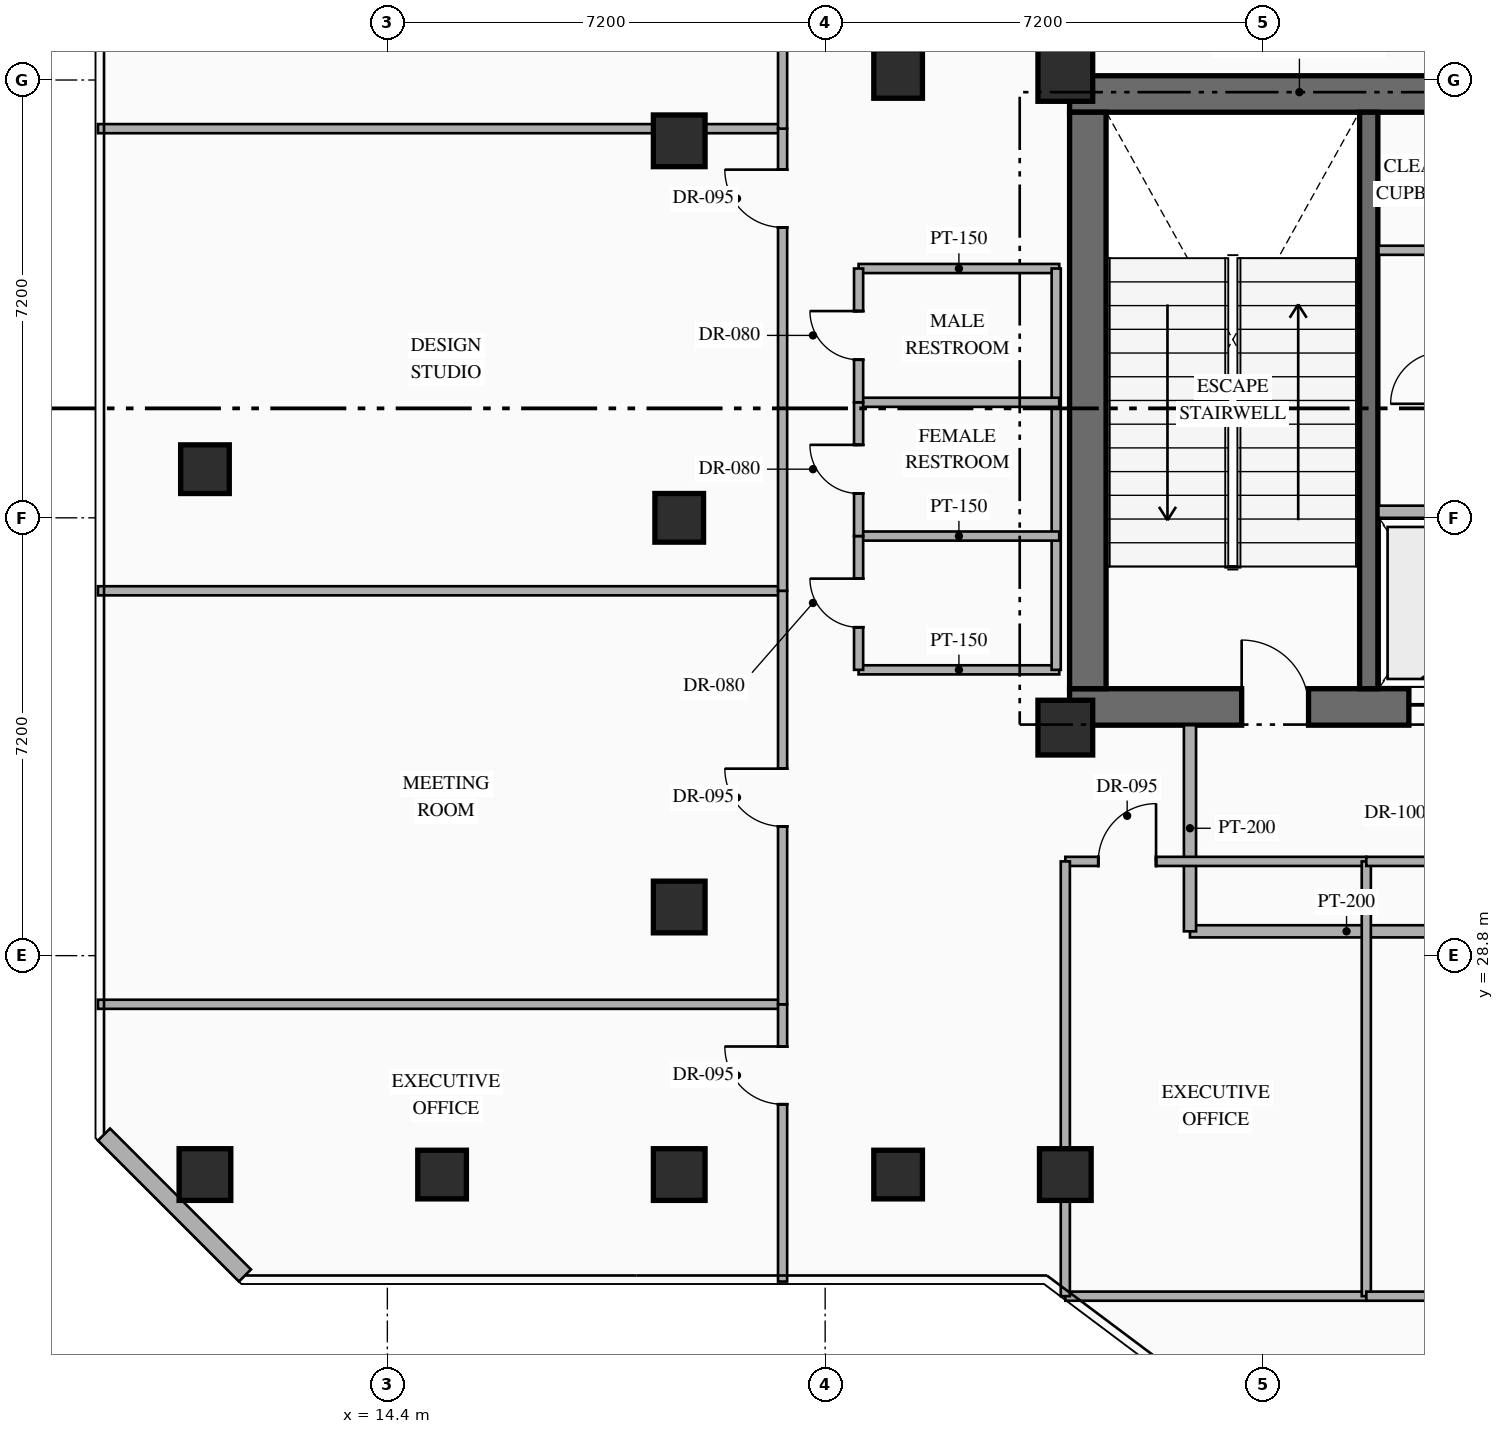
"""IFC4 building model, lengths in metres.
Left out: names, types, materials, properties, quantities, classifications, styles, units other than length and angle.
Written with IfcOpenShell. Run it as: python <this file> out.ifc"""

import sys

from ifc_helpers import new_model, si_unit, direction, frame, frame_2d, origin, origin_2d, place, context, subcontext, project, spatial, rectangle, hollow_rectangle, extrude, element, fill, save


model = new_model("IFC4")
c1 = context("Model", 3, precision=1e-05, world=origin(), true_north=direction((0.0, 1.0)))
c2 = subcontext(c1, "Body", "Model", "MODEL_VIEW")
j1 = project(units=[si_unit("LENGTHUNIT", "METRE"), si_unit("PLANEANGLEUNIT", "RADIAN")], contexts=[c1])
p1 = place(None, origin())
s1 = spatial("IfcSite", under=j1, at=p1, CompositionType="ELEMENT")
p2 = place(p1, origin())
s2 = spatial("IfcBuilding", under=s1, at=p2, CompositionType="ELEMENT")
p3 = place(p2, frame((0.0, 0.0, 130.05)))
s3 = spatial("IfcBuildingStorey", under=s2, at=p3, CompositionType="ELEMENT", Elevation=130.05)
p4 = place(p3, frame((25.62, 32.89, 0.0), z_axis=(0.0, 0.0, 1.0), x_axis=(1.0, 0.0, 0.0)))
e1 = element("IfcWall", 1, at=p4, inside=s3, PredefinedType="SHEAR", context=c2, shape_type="SweptSolid", body=[
    extrude(rectangle(XDim=7.78, YDim=0.6, at=frame_2d((3.89, 0.0))), origin(), (0.0, 0.0, 1.0), 4.8),
])
p5 = place(p4, frame((2.83, 0.0, 0.0)))
e2 = element("IfcOpeningElement", 2, at=p5, cuts=e1, PredefinedType="OPENING", context=c2, shape_type="SweptSolid", body=[
    extrude(rectangle(XDim=1.1, YDim=2.2, at=frame_2d((0.55, 1.1))), frame((0.0, 0.31, 0.0), z_axis=(0.0, -1.0, 0.0), x_axis=(1.0, 0.0, 0.0)), (0.0, 0.0, 1.0), 0.62),
])
p6 = place(p4, frame((5.58, 0.0, 0.0)))
e3 = element("IfcOpeningElement", 3, at=p6, cuts=e1, PredefinedType="OPENING", context=c2, shape_type="SweptSolid", body=[
    extrude(rectangle(XDim=1.1, YDim=2.15, at=frame_2d((0.55, 1.075))), frame((0.0, 0.31, 0.0), z_axis=(0.0, -1.0, 0.0), x_axis=(1.0, 0.0, 0.0)), (0.0, 0.0, 1.0), 0.62),
])
p7 = place(p3, frame((25.62, 42.97, 0.0), z_axis=(0.0, 0.0, 1.0), x_axis=(1.0, 0.0, 0.0)))
e4 = element("IfcWall", 4, at=p7, inside=s3, PredefinedType="SHEAR", context=c2, shape_type="SweptSolid", body=[
    extrude(rectangle(XDim=7.78, YDim=0.6, at=frame_2d((3.89, 0.0))), origin(), (0.0, 0.0, 1.0), 4.8),
])
p8 = place(p3, frame((25.92, 33.19, 0.0), z_axis=(0.0, 0.0, 1.0), x_axis=(0.0, 1.0, 0.0)))
e5 = element("IfcWall", 5, at=p8, inside=s3, PredefinedType="SHEAR", context=c2, shape_type="SweptSolid", body=[
    extrude(rectangle(XDim=9.48, YDim=0.6, at=frame_2d((4.74, 0.0))), origin(), (0.0, 0.0, 1.0), 4.8),
])
p9 = place(p3, frame((30.54, 33.19, 0.0), z_axis=(0.0, 0.0, 1.0), x_axis=(0.0, 1.0, 0.0)))
e6 = element("IfcWall", 6, at=p9, inside=s3, PredefinedType="SHEAR", context=c2, shape_type="SweptSolid", body=[
    extrude(rectangle(XDim=9.48, YDim=0.3, at=frame_2d((4.74, 0.0))), origin(), (0.0, 0.0, 1.0), 4.8),
])
for number, where, z_axis, x_axis in (
    (7, (25.55, 32.55, 0.0), (0.0, 0.0, 1.0), (1.0, 0.0, 0.0)),
    (8, (25.55, 43.3, 0.0), (0.0, 0.0, 1.0), (1.0, 0.0, 0.0)),
):
    element("IfcColumn", number, at=place(p3, frame(where, z_axis=z_axis, x_axis=x_axis)), inside=s3, PredefinedType="COLUMN", context=c2, shape_type="SweptSolid", body=[
        extrude(rectangle(XDim=0.9, YDim=0.9, at=origin_2d()), origin(), (0.0, 0.0, 1.0), 4.8),
    ])
for number, where, z_axis, x_axis in (
    (9, (25.55, 25.2, 0.0), (0.0, 0.0, 1.0), (1.0, 0.0, 0.0)),
    (10, (11.4, 25.2, 0.0), (0.0, 0.0, 1.0), (1.0, 0.0, 0.0)),
    (11, (19.2, 25.2, 0.0), (0.0, 0.0, 1.0), (1.0, 0.0, 0.0)),
    (12, (19.2, 29.6, 0.0), (0.0, 0.0, 1.0), (1.0, 0.0, 0.0)),
    (13, (19.2, 42.2, 0.0), (0.0, 0.0, 1.0), (1.0, 0.0, 0.0)),
):
    element("IfcColumn", number, at=place(p3, frame(where, z_axis=z_axis, x_axis=x_axis)), inside=s3, PredefinedType="COLUMN", context=c2, shape_type="SweptSolid", body=[
        extrude(hollow_rectangle(XDim=0.85, YDim=0.85, WallThickness=0.032, at=origin_2d()), origin(), (0.0, 0.0, 1.0), 4.8),
    ])
for number, where, z_axis, x_axis in (
    (14, (22.8, 25.2, 0.0), (0.0, 0.0, 1.0), (1.0, 0.0, 0.0)),
    (15, (22.8, 43.3, 0.0), (0.0, 0.0, 1.0), (1.0, 0.0, 0.0)),
    (16, (11.4, 36.8, 0.0), (0.0, 0.0, 1.0), (1.0, 0.0, 0.0)),
    (17, (19.2, 36.0, 0.0), (0.0, 0.0, 1.0), (1.0, 0.0, 0.0)),
    (18, (15.3, 25.2, 0.0), (0.0, 0.0, 1.0), (1.0, 0.0, 0.0)),
):
    element("IfcColumn", number, at=place(p3, frame(where, z_axis=z_axis, x_axis=x_axis)), inside=s3, PredefinedType="COLUMN", context=c2, shape_type="SweptSolid", body=[
        extrude(hollow_rectangle(XDim=0.8, YDim=0.8, WallThickness=0.032, at=origin_2d()), origin(), (0.0, 0.0, 1.0), 4.8),
    ])
p10 = place(p3, frame((12.058, 23.54, 0.0), z_axis=(0.0, 0.0, 1.0), x_axis=(-0.707144017911, 0.707069542501, 0.0)))
e19 = element("IfcWall", 19, at=p10, inside=s3, PredefinedType="STANDARD", context=c2, shape_type="SweptSolid", body=[
    extrude(rectangle(XDim=3.278, YDim=0.28, at=frame_2d((1.639, 0.0))), origin(), (0.0, 0.0, 1.0), 4.55),
])
p11 = place(p3, frame((30.7, 36.1, 0.0), z_axis=(0.0, 0.0, 1.0), x_axis=(1.0, 0.0, 0.0)))
e20 = element("IfcWall", 20, at=p11, inside=s3, PredefinedType="STANDARD", context=c2, shape_type="SweptSolid", body=[
    extrude(rectangle(XDim=2.1, YDim=0.2, at=frame_2d((1.05, 0.0))), origin(), (0.0, 0.0, 1.0), 4.55),
])
p12 = place(p3, frame((30.7, 40.4, 0.0), z_axis=(0.0, 0.0, 1.0), x_axis=(1.0, 0.0, 0.0)))
e21 = element("IfcWall", 21, at=p12, inside=s3, PredefinedType="PARTITIONING", context=c2, shape_type="SweptSolid", body=[
    extrude(rectangle(XDim=2.1, YDim=0.15, at=frame_2d((1.05, 0.0))), origin(), (0.0, 0.0, 1.0), 4.55),
])
p13 = place(p3, frame((27.6, 29.2, 0.0), z_axis=(0.0, 0.0, 1.0), x_axis=(1.0, 0.0, 0.0)))
e22 = element("IfcWall", 22, at=p13, inside=s3, PredefinedType="STANDARD", context=c2, shape_type="SweptSolid", body=[
    extrude(rectangle(XDim=5.15, YDim=0.2, at=frame_2d((2.575, 0.0))), origin(), (0.0, 0.0, 1.0), 4.55),
])
p14 = place(p3, frame((27.6, 29.2, 0.0), z_axis=(0.0, 0.0, 1.0), x_axis=(0.0, 1.0, 0.0)))
e23 = element("IfcWall", 23, at=p14, inside=s3, PredefinedType="STANDARD", context=c2, shape_type="SweptSolid", body=[
    extrude(rectangle(XDim=3.39, YDim=0.2, at=frame_2d((1.695, 0.0))), origin(), (0.0, 0.0, 1.0), 4.55),
])
for number, where, z_axis, x_axis in (
    (24, (22.15, 33.5, 0.0), (0.0, 0.0, 1.0), (1.0, 0.0, 0.0)),
    (25, (22.15, 40.1, 0.0), (0.0, 0.0, 1.0), (1.0, 0.0, 0.0)),
):
    element("IfcWall", number, at=place(p3, frame(where, z_axis=z_axis, x_axis=x_axis)), inside=s3, PredefinedType="PARTITIONING", context=c2, shape_type="SweptSolid", body=[
        extrude(rectangle(XDim=3.3, YDim=0.15, at=frame_2d((1.65, 0.0))), origin(), (0.0, 0.0, 1.0), 4.55),
    ])
p15 = place(p3, frame((25.4, 33.5, 0.0), z_axis=(0.0, 0.0, 1.0), x_axis=(0.0, 1.0, 0.0)))
e26 = element("IfcWall", 26, at=p15, inside=s3, PredefinedType="PARTITIONING", context=c2, shape_type="SweptSolid", body=[
    extrude(rectangle(XDim=6.6, YDim=0.15, at=frame_2d((3.3, 0.0))), origin(), (0.0, 0.0, 1.0), 4.55),
])
for number, where, z_axis, x_axis in (
    (27, (22.15, 35.7, 0.0), (0.0, 0.0, 1.0), (1.0, 0.0, 0.0)),
    (28, (22.15, 37.9, 0.0), (0.0, 0.0, 1.0), (1.0, 0.0, 0.0)),
):
    element("IfcWall", number, at=place(p3, frame(where, z_axis=z_axis, x_axis=x_axis)), inside=s3, PredefinedType="PARTITIONING", context=c2, shape_type="SweptSolid", body=[
        extrude(rectangle(XDim=3.3, YDim=0.15, at=frame_2d((1.65, 0.0))), origin(), (0.0, 0.0, 1.0), 4.55),
    ])
p16 = place(p3, frame((22.15, 33.5, 0.0), z_axis=(0.0, 0.0, 1.0), x_axis=(0.0, 1.0, 0.0)))
e29 = element("IfcWall", 29, at=p16, inside=s3, PredefinedType="PARTITIONING", context=c2, shape_type="SweptSolid", body=[
    extrude(rectangle(XDim=2.2, YDim=0.15, at=frame_2d((1.1, 0.0))), origin(), (0.0, 0.0, 1.0), 4.55),
])
p17 = place(p16, frame((0.7, 0.0, 0.0)))
e30 = element("IfcOpeningElement", 30, at=p17, cuts=e29, PredefinedType="OPENING", context=c2, shape_type="SweptSolid", body=[
    extrude(rectangle(XDim=0.8, YDim=2.06, at=frame_2d((0.4, 1.03))), frame((0.0, 0.085, 0.0), z_axis=(0.0, -1.0, 0.0), x_axis=(1.0, 0.0, 0.0)), (0.0, 0.0, 1.0), 0.17),
])
p18 = place(p3, frame((22.15, 35.7, 0.0), z_axis=(0.0, 0.0, 1.0), x_axis=(0.0, 1.0, 0.0)))
e31 = element("IfcWall", 31, at=p18, inside=s3, PredefinedType="PARTITIONING", context=c2, shape_type="SweptSolid", body=[
    extrude(rectangle(XDim=2.2, YDim=0.15, at=frame_2d((1.1, 0.0))), origin(), (0.0, 0.0, 1.0), 4.55),
])
p19 = place(p18, frame((0.7, 0.0, 0.0)))
e32 = element("IfcOpeningElement", 32, at=p19, cuts=e31, PredefinedType="OPENING", context=c2, shape_type="SweptSolid", body=[
    extrude(rectangle(XDim=0.8, YDim=2.06, at=frame_2d((0.4, 1.03))), frame((0.0, 0.085, 0.0), z_axis=(0.0, -1.0, 0.0), x_axis=(1.0, 0.0, 0.0)), (0.0, 0.0, 1.0), 0.17),
])
p20 = place(p3, frame((22.15, 37.9, 0.0), z_axis=(0.0, 0.0, 1.0), x_axis=(0.0, 1.0, 0.0)))
e33 = element("IfcWall", 33, at=p20, inside=s3, PredefinedType="PARTITIONING", context=c2, shape_type="SweptSolid", body=[
    extrude(rectangle(XDim=2.2, YDim=0.15, at=frame_2d((1.1, 0.0))), origin(), (0.0, 0.0, 1.0), 4.55),
])
p21 = place(p20, frame((0.7, 0.0, 0.0)))
e34 = element("IfcOpeningElement", 34, at=p21, cuts=e33, PredefinedType="OPENING", context=c2, shape_type="SweptSolid", body=[
    extrude(rectangle(XDim=0.8, YDim=2.06, at=frame_2d((0.4, 1.03))), frame((0.0, 0.085, 0.0), z_axis=(0.0, -1.0, 0.0), x_axis=(1.0, 0.0, 0.0)), (0.0, 0.0, 1.0), 0.17),
])
p22 = place(p3, frame((25.55, 23.2, 0.0), z_axis=(0.0, 0.0, 1.0), x_axis=(1.0, 0.0, 0.0)))
e35 = element("IfcWall", 35, at=p22, inside=s3, PredefinedType="PARTITIONING", context=c2, shape_type="SweptSolid", body=[
    extrude(rectangle(XDim=4.95, YDim=0.15, at=frame_2d((2.475, 0.0))), origin(), (0.0, 0.0, 1.0), 4.55),
])
p23 = place(p3, frame((25.55, 30.35, 0.0), z_axis=(0.0, 0.0, 1.0), x_axis=(1.0, 0.0, 0.0)))
e36 = element("IfcWall", 36, at=p23, inside=s3, PredefinedType="PARTITIONING", context=c2, shape_type="SweptSolid", body=[
    extrude(rectangle(XDim=4.95, YDim=0.15, at=frame_2d((2.475, 0.0))), origin(), (0.0, 0.0, 1.0), 4.55),
])
p24 = place(p23, frame((0.542, 0.0, 0.0)))
e37 = element("IfcOpeningElement", 37, at=p24, cuts=e36, PredefinedType="OPENING", context=c2, shape_type="SweptSolid", body=[
    extrude(rectangle(XDim=0.95, YDim=2.15, at=frame_2d((0.475, 1.075))), frame((0.0, 0.085, 0.0), z_axis=(0.0, -1.0, 0.0), x_axis=(1.0, 0.0, 0.0)), (0.0, 0.0, 1.0), 0.17),
])
p25 = place(p3, frame((25.55, 23.2, 0.0), z_axis=(0.0, 0.0, 1.0), x_axis=(0.0, 1.0, 0.0)))
e38 = element("IfcWall", 38, at=p25, inside=s3, PredefinedType="PARTITIONING", context=c2, shape_type="SweptSolid", body=[
    extrude(rectangle(XDim=7.15, YDim=0.15, at=frame_2d((3.575, 0.0))), origin(), (0.0, 0.0, 1.0), 3.745),
])
p26 = place(p3, frame((30.5, 23.2, 0.0), z_axis=(0.0, 0.0, 1.0), x_axis=(0.0, 1.0, 0.0)))
e39 = element("IfcWall", 39, at=p26, inside=s3, PredefinedType="PARTITIONING", context=c2, shape_type="SweptSolid", body=[
    extrude(rectangle(XDim=7.15, YDim=0.15, at=frame_2d((3.575, 0.0))), origin(), (0.0, 0.0, 1.0), 4.55),
])
p27 = place(p3, frame((30.5, 23.2, 0.0), z_axis=(0.0, 0.0, 1.0), x_axis=(1.0, 0.0, 0.0)))
e40 = element("IfcWall", 40, at=p27, inside=s3, PredefinedType="PARTITIONING", context=c2, shape_type="SweptSolid", body=[
    extrude(rectangle(XDim=4.45, YDim=0.15, at=frame_2d((2.225, 0.0))), origin(), (0.0, 0.0, 1.0), 4.55),
])
p28 = place(p3, frame((30.5, 30.35, 0.0), z_axis=(0.0, 0.0, 1.0), x_axis=(1.0, 0.0, 0.0)))
e41 = element("IfcWall", 41, at=p28, inside=s3, PredefinedType="PARTITIONING", context=c2, shape_type="SweptSolid", body=[
    extrude(rectangle(XDim=4.45, YDim=0.15, at=frame_2d((2.225, 0.0))), origin(), (0.0, 0.0, 1.0), 4.55),
])
p29 = place(p28, frame((2.846, 0.0, 0.0)))
e42 = element("IfcOpeningElement", 42, at=p29, cuts=e41, PredefinedType="OPENING", context=c2, shape_type="SweptSolid", body=[
    extrude(rectangle(XDim=0.95, YDim=2.15, at=frame_2d((0.475, 1.075))), frame((0.0, 0.085, 0.0), z_axis=(0.0, -1.0, 0.0), x_axis=(1.0, 0.0, 0.0)), (0.0, 0.0, 1.0), 0.17),
])
p30 = place(p3, frame((9.64, 28.0, 0.0), z_axis=(0.0, 0.0, 1.0), x_axis=(1.0, 0.0, 0.0)))
e43 = element("IfcWall", 43, at=p30, inside=s3, PredefinedType="PARTITIONING", context=c2, shape_type="SweptSolid", body=[
    extrude(rectangle(XDim=11.26, YDim=0.15, at=frame_2d((5.63, 0.0))), origin(), (0.0, 0.0, 1.0), 4.55),
])
p31 = place(p3, frame((20.9, 23.44, 0.0), z_axis=(0.0, 0.0, 1.0), x_axis=(0.0, 1.0, 0.0)))
e44 = element("IfcWall", 44, at=p31, inside=s3, PredefinedType="PARTITIONING", context=c2, shape_type="SweptSolid", body=[
    extrude(rectangle(XDim=4.56, YDim=0.15, at=frame_2d((2.28, 0.0))), origin(), (0.0, 0.0, 1.0), 4.55),
])
p32 = place(p31, frame((2.916, 0.0, 0.0)))
e45 = element("IfcOpeningElement", 45, at=p32, cuts=e44, PredefinedType="OPENING", context=c2, shape_type="SweptSolid", body=[
    extrude(rectangle(XDim=0.95, YDim=2.15, at=frame_2d((0.475, 1.075))), frame((0.0, 0.085, 0.0), z_axis=(0.0, -1.0, 0.0), x_axis=(1.0, 0.0, 0.0)), (0.0, 0.0, 1.0), 0.17),
])
p33 = place(p3, frame((9.64, 34.8, 0.0), z_axis=(0.0, 0.0, 1.0), x_axis=(1.0, 0.0, 0.0)))
e46 = element("IfcWall", 46, at=p33, inside=s3, PredefinedType="PARTITIONING", context=c2, shape_type="SweptSolid", body=[
    extrude(rectangle(XDim=11.26, YDim=0.15, at=frame_2d((5.63, 0.0))), origin(), (0.0, 0.0, 1.0), 4.55),
])
p34 = place(p3, frame((20.9, 28.0, 0.0), z_axis=(0.0, 0.0, 1.0), x_axis=(0.0, 1.0, 0.0)))
e47 = element("IfcWall", 47, at=p34, inside=s3, PredefinedType="PARTITIONING", context=c2, shape_type="SweptSolid", body=[
    extrude(rectangle(XDim=6.8, YDim=0.15, at=frame_2d((3.4, 0.0))), origin(), (0.0, 0.0, 1.0), 4.55),
])
p35 = place(p34, frame((2.925, 0.0, 0.0)))
e48 = element("IfcOpeningElement", 48, at=p35, cuts=e47, PredefinedType="OPENING", context=c2, shape_type="SweptSolid", body=[
    extrude(rectangle(XDim=0.95, YDim=2.15, at=frame_2d((0.475, 1.075))), frame((0.0, 0.085, 0.0), z_axis=(0.0, -1.0, 0.0), x_axis=(1.0, 0.0, 0.0)), (0.0, 0.0, 1.0), 0.17),
])
p36 = place(p3, frame((9.64, 42.4, 0.0), z_axis=(0.0, 0.0, 1.0), x_axis=(1.0, 0.0, 0.0)))
e49 = element("IfcWall", 49, at=p36, inside=s3, PredefinedType="PARTITIONING", context=c2, shape_type="SweptSolid", body=[
    extrude(rectangle(XDim=11.26, YDim=0.15, at=frame_2d((5.63, 0.0))), origin(), (0.0, 0.0, 1.0), 4.55),
])
p37 = place(p3, frame((20.9, 34.8, 0.0), z_axis=(0.0, 0.0, 1.0), x_axis=(0.0, 1.0, 0.0)))
e50 = element("IfcWall", 50, at=p37, inside=s3, PredefinedType="PARTITIONING", context=c2, shape_type="SweptSolid", body=[
    extrude(rectangle(XDim=7.6, YDim=0.15, at=frame_2d((3.8, 0.0))), origin(), (0.0, 0.0, 1.0), 4.55),
])
p38 = place(p37, frame((5.976, 0.0, 0.0)))
e51 = element("IfcOpeningElement", 51, at=p38, cuts=e50, PredefinedType="OPENING", context=c2, shape_type="SweptSolid", body=[
    extrude(rectangle(XDim=0.95, YDim=2.15, at=frame_2d((0.475, 1.075))), frame((0.0, 0.085, 0.0), z_axis=(0.0, -1.0, 0.0), x_axis=(1.0, 0.0, 0.0)), (0.0, 0.0, 1.0), 0.17),
])
p39 = place(p3, frame((20.9, 42.4, 0.0), z_axis=(0.0, 0.0, 1.0), x_axis=(0.0, 1.0, 0.0)))
e52 = element("IfcWall", 52, at=p39, inside=s3, PredefinedType="PARTITIONING", context=c2, shape_type="SweptSolid", body=[
    extrude(rectangle(XDim=7.96, YDim=0.15, at=frame_2d((3.98, 0.0))), origin(), (0.0, 0.0, 1.0), 4.55),
])
p40 = place(p39, frame((4.13, 0.0, 0.0)))
e53 = element("IfcOpeningElement", 53, at=p40, cuts=e52, PredefinedType="OPENING", context=c2, shape_type="SweptSolid", body=[
    extrude(rectangle(XDim=0.95, YDim=2.15, at=frame_2d((0.475, 1.075))), frame((0.0, 0.085, 0.0), z_axis=(0.0, -1.0, 0.0), x_axis=(1.0, 0.0, 0.0)), (0.0, 0.0, 1.0), 0.17),
])
p41 = place(p5, origin())
e54 = element("IfcDoor", 54, at=p41, inside=s3, OperationType="SINGLE_SWING_LEFT", PredefinedType="DOOR", context=c2, shape_type="SweptSolid", body=[
    extrude(rectangle(XDim=1.1, YDim=2.2, at=frame_2d((0.55, 1.1))), frame((0.0, 0.025, 0.0), z_axis=(0.0, -1.0, 0.0), x_axis=(1.0, 0.0, 0.0)), (0.0, 0.0, 1.0), 0.05),
])
fill(e2, e54)
p42 = place(p6, origin())
e55 = element("IfcDoor", 55, at=p42, inside=s3, OperationType="SLIDING_TO_LEFT", PredefinedType="USERDEFINED", context=c2, shape_type="SweptSolid", body=[
    extrude(rectangle(XDim=1.1, YDim=2.15, at=frame_2d((0.55, 1.075))), frame((0.0, 0.025, 0.0), z_axis=(0.0, -1.0, 0.0), x_axis=(1.0, 0.0, 0.0)), (0.0, 0.0, 1.0), 0.05),
])
fill(e3, e55)
p43 = place(p17, origin())
e56 = element("IfcDoor", 56, at=p43, inside=s3, OperationType="SINGLE_SWING_RIGHT", PredefinedType="DOOR", context=c2, shape_type="SweptSolid", body=[
    extrude(rectangle(XDim=0.8, YDim=2.06, at=frame_2d((0.4, 1.03))), frame((0.0, 0.025, 0.0), z_axis=(0.0, -1.0, 0.0), x_axis=(1.0, 0.0, 0.0)), (0.0, 0.0, 1.0), 0.05),
])
fill(e30, e56)
p44 = place(p19, origin())
e57 = element("IfcDoor", 57, at=p44, inside=s3, OperationType="SINGLE_SWING_RIGHT", PredefinedType="DOOR", context=c2, shape_type="SweptSolid", body=[
    extrude(rectangle(XDim=0.8, YDim=2.06, at=frame_2d((0.4, 1.03))), frame((0.0, 0.025, 0.0), z_axis=(0.0, -1.0, 0.0), x_axis=(1.0, 0.0, 0.0)), (0.0, 0.0, 1.0), 0.05),
])
fill(e32, e57)
p45 = place(p21, origin())
e58 = element("IfcDoor", 58, at=p45, inside=s3, OperationType="SINGLE_SWING_RIGHT", PredefinedType="DOOR", context=c2, shape_type="SweptSolid", body=[
    extrude(rectangle(XDim=0.8, YDim=2.06, at=frame_2d((0.4, 1.03))), frame((0.0, 0.025, 0.0), z_axis=(0.0, -1.0, 0.0), x_axis=(1.0, 0.0, 0.0)), (0.0, 0.0, 1.0), 0.05),
])
fill(e34, e58)
p46 = place(p24, origin())
e59 = element("IfcDoor", 59, at=p46, inside=s3, OperationType="SINGLE_SWING_RIGHT", PredefinedType="DOOR", context=c2, shape_type="SweptSolid", body=[
    extrude(rectangle(XDim=0.95, YDim=2.15, at=frame_2d((0.475, 1.075))), frame((0.0, 0.025, 0.0), z_axis=(0.0, -1.0, 0.0), x_axis=(1.0, 0.0, 0.0)), (0.0, 0.0, 1.0), 0.05),
])
fill(e37, e59)
p47 = place(p32, origin())
e60 = element("IfcDoor", 60, at=p47, inside=s3, OperationType="SINGLE_SWING_RIGHT", PredefinedType="DOOR", context=c2, shape_type="SweptSolid", body=[
    extrude(rectangle(XDim=0.95, YDim=2.15, at=frame_2d((0.475, 1.075))), frame((0.0, 0.025, 0.0), z_axis=(0.0, -1.0, 0.0), x_axis=(1.0, 0.0, 0.0)), (0.0, 0.0, 1.0), 0.05),
])
fill(e45, e60)
p48 = place(p35, origin())
e61 = element("IfcDoor", 61, at=p48, inside=s3, OperationType="SINGLE_SWING_RIGHT", PredefinedType="DOOR", context=c2, shape_type="SweptSolid", body=[
    extrude(rectangle(XDim=0.95, YDim=2.15, at=frame_2d((0.475, 1.075))), frame((0.0, 0.025, 0.0), z_axis=(0.0, -1.0, 0.0), x_axis=(1.0, 0.0, 0.0)), (0.0, 0.0, 1.0), 0.05),
])
fill(e48, e61)
p49 = place(p38, origin())
e62 = element("IfcDoor", 62, at=p49, inside=s3, OperationType="SINGLE_SWING_RIGHT", PredefinedType="DOOR", context=c2, shape_type="SweptSolid", body=[
    extrude(rectangle(XDim=0.95, YDim=2.15, at=frame_2d((0.475, 1.075))), frame((0.0, 0.025, 0.0), z_axis=(0.0, -1.0, 0.0), x_axis=(1.0, 0.0, 0.0)), (0.0, 0.0, 1.0), 0.05),
])
fill(e51, e62)
save(model, sys.argv[1])
